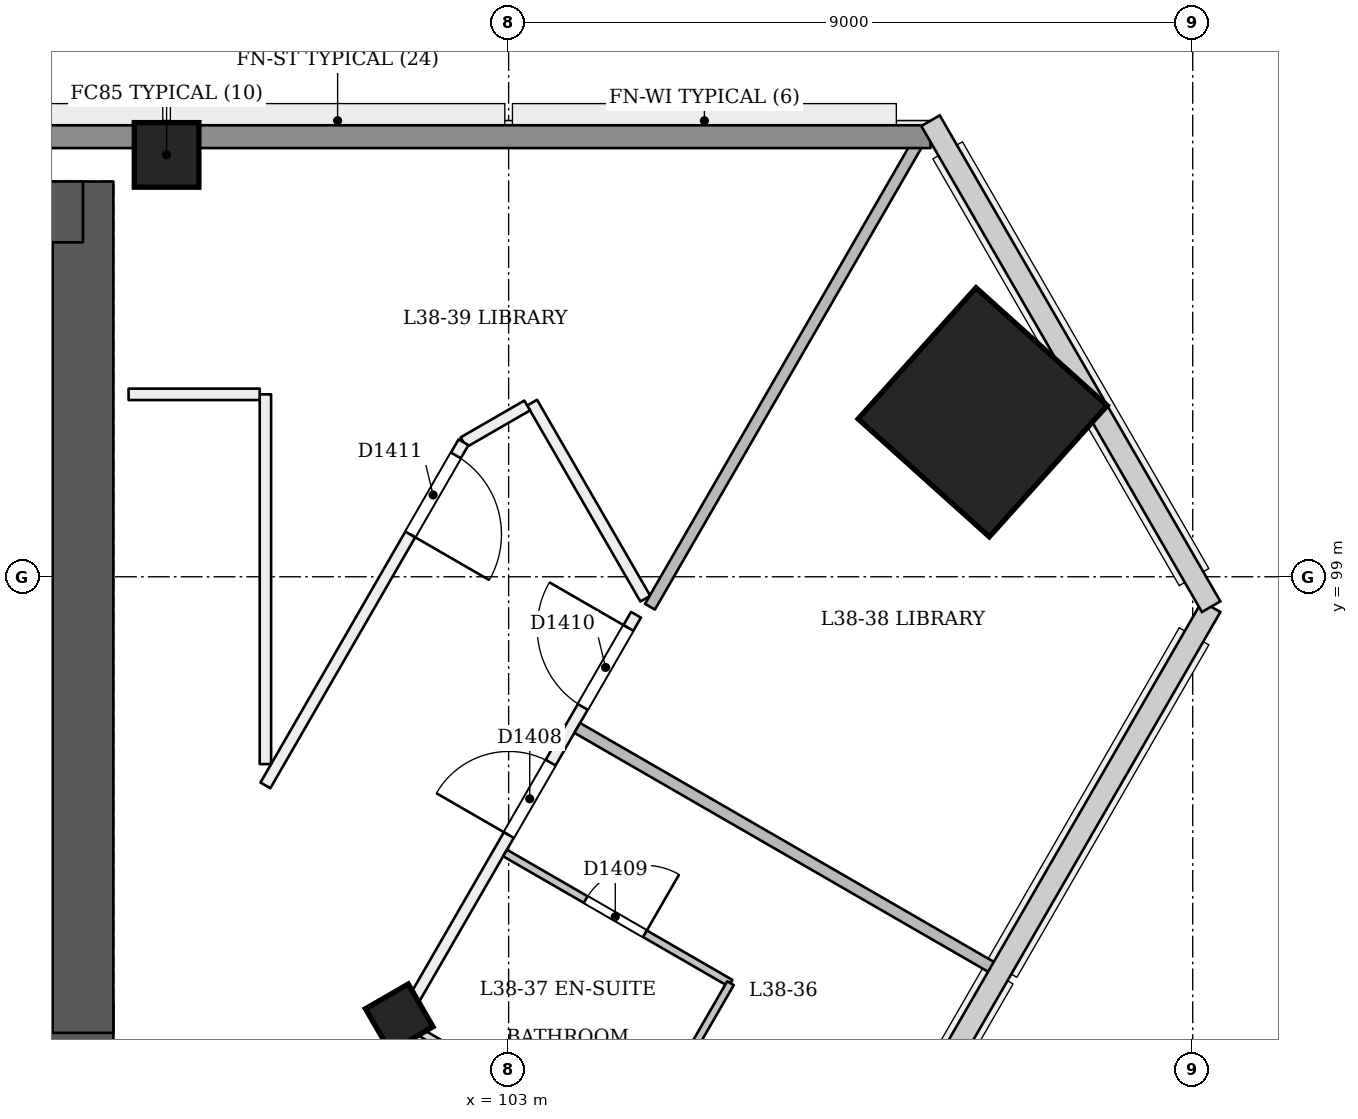
"""IFC4 building model, lengths in metres.
Left out: names, types, materials, properties, quantities, classifications, styles, units other than length and angle.
Written with IfcOpenShell. Run it as: python <this file> out.ifc"""

import sys

from ifc_helpers import new_model, si_unit, direction, frame, frame_2d, origin, origin_2d, place, context, subcontext, project, spatial, rectangle, extrude, element, fill, save


model = new_model("IFC4")
c1 = context("Model", 3, precision=1e-05, world=origin(), true_north=direction((0.0, 1.0)))
c2 = subcontext(c1, "Body", "Model", "MODEL_VIEW")
j1 = project(units=[si_unit("LENGTHUNIT", "METRE"), si_unit("PLANEANGLEUNIT", "RADIAN")], contexts=[c1])
p1 = place(None, origin())
s1 = spatial("IfcSite", under=j1, at=p1, CompositionType="ELEMENT")
p2 = place(p1, origin())
s2 = spatial("IfcBuilding", under=s1, at=p2, CompositionType="ELEMENT")
p3 = place(p2, frame((0.0, 0.0, 149.4)))
s3 = spatial("IfcBuildingStorey", under=s2, at=p3, CompositionType="ELEMENT", Elevation=149.4)
p4 = place(p3, frame((72.6, 93.0, 0.0), z_axis=(0.0, 0.0, 1.0), x_axis=(1.0, 0.0, 0.0)))
e1 = element("IfcWall", 1, at=p4, inside=s3, PredefinedType="SHEAR", context=c2, shape_type="SweptSolid", body=[
    extrude(rectangle(XDim=25.2, YDim=0.8, at=frame_2d((12.6, 0.0))), origin(), (0.0, 0.0, 1.0), 3.6),
])
p5 = place(p4, frame((1.2, 0.0, 0.0)))
e2 = element("IfcOpeningElement", 2, at=p5, cuts=e1, PredefinedType="OPENING", context=c2, shape_type="SweptSolid", body=[
    extrude(rectangle(XDim=1.2, YDim=2.1, at=frame_2d((0.6, 1.05))), frame((0.0, 0.411, 0.0), z_axis=(0.0, -1.0, 0.0), x_axis=(1.0, 0.0, 0.0)), (0.0, 0.0, 1.0), 0.821),
])
p6 = place(p4, frame((3.4, 0.0, 0.0)))
e3 = element("IfcOpeningElement", 3, at=p6, cuts=e1, PredefinedType="OPENING", context=c2, shape_type="SweptSolid", body=[
    extrude(rectangle(XDim=1.2, YDim=2.1, at=frame_2d((0.6, 1.05))), frame((0.0, 0.411, 0.0), z_axis=(0.0, -1.0, 0.0), x_axis=(1.0, 0.0, 0.0)), (0.0, 0.0, 1.0), 0.821),
])
p7 = place(p4, frame((13.4, 0.0, 0.0)))
e4 = element("IfcOpeningElement", 4, at=p7, cuts=e1, PredefinedType="OPENING", context=c2, shape_type="SweptSolid", body=[
    extrude(rectangle(XDim=1.2, YDim=2.1, at=frame_2d((0.6, 1.05))), frame((0.0, 0.411, 0.0), z_axis=(0.0, -1.0, 0.0), x_axis=(1.0, 0.0, 0.0)), (0.0, 0.0, 1.0), 0.821),
])
p8 = place(p4, frame((15.462, 0.0, 0.0)))
e5 = element("IfcOpeningElement", 5, at=p8, cuts=e1, PredefinedType="OPENING", context=c2, shape_type="SweptSolid", body=[
    extrude(rectangle(XDim=1.0, YDim=2.1, at=frame_2d((0.5, 1.05))), frame((0.0, 0.411, 0.0), z_axis=(0.0, -1.0, 0.0), x_axis=(1.0, 0.0, 0.0)), (0.0, 0.0, 1.0), 0.821),
])
p9 = place(p4, frame((17.7, 0.0, 0.0)))
e6 = element("IfcOpeningElement", 6, at=p9, cuts=e1, PredefinedType="OPENING", context=c2, shape_type="SweptSolid", body=[
    extrude(rectangle(XDim=1.0, YDim=2.1, at=frame_2d((0.5, 1.05))), frame((0.0, 0.411, 0.0), z_axis=(0.0, -1.0, 0.0), x_axis=(1.0, 0.0, 0.0)), (0.0, 0.0, 1.0), 0.821),
])
p10 = place(p4, frame((20.25, 0.0, 0.0)))
e7 = element("IfcOpeningElement", 7, at=p10, cuts=e1, PredefinedType="OPENING", context=c2, shape_type="SweptSolid", body=[
    extrude(rectangle(XDim=1.0, YDim=2.1, at=frame_2d((0.5, 1.05))), frame((0.0, 0.411, 0.0), z_axis=(0.0, -1.0, 0.0), x_axis=(1.0, 0.0, 0.0)), (0.0, 0.0, 1.0), 0.821),
])
p11 = place(p4, frame((22.738, 0.0, 0.0)))
e8 = element("IfcOpeningElement", 8, at=p11, cuts=e1, PredefinedType="OPENING", context=c2, shape_type="SweptSolid", body=[
    extrude(rectangle(XDim=1.0, YDim=2.1, at=frame_2d((0.5, 1.05))), frame((0.0, 0.411, 0.0), z_axis=(0.0, -1.0, 0.0), x_axis=(1.0, 0.0, 0.0)), (0.0, 0.0, 1.0), 0.821),
])
p12 = place(p3, frame((97.4, 93.0, 0.0), z_axis=(0.0, 0.0, 1.0), x_axis=(0.0, 1.0, 0.0)))
e9 = element("IfcWall", 9, at=p12, inside=s3, PredefinedType="SHEAR", context=c2, shape_type="SweptSolid", body=[
    extrude(rectangle(XDim=11.2, YDim=0.8, at=frame_2d((5.6, 0.0))), origin(), (0.0, 0.0, 1.0), 3.6),
])
p13 = place(p3, frame((97.4, 103.8, 0.0), z_axis=(0.0, 0.0, 1.0), x_axis=(-1.0, 0.0, 0.0)))
e10 = element("IfcWall", 10, at=p13, inside=s3, PredefinedType="SHEAR", context=c2, shape_type="SweptSolid", body=[
    extrude(rectangle(XDim=25.2, YDim=0.8, at=frame_2d((12.6, 0.0))), origin(), (0.0, 0.0, 1.0), 3.6),
])
p14 = place(p3, frame((101.588, 93.151, -0.02), z_axis=(-0.022222852987, 0.038483477124, 0.999012095419), x_axis=(-0.500174641503, -0.865639430517, 0.022219458401)))
e11 = element("IfcColumn", 11, at=p14, inside=s3, PredefinedType="COLUMN", context=c2, shape_type="SweptSolid", body=[
    extrude(rectangle(XDim=0.65, YDim=0.65, at=origin_2d()), origin(), (0.0, 0.0, 1.0), 3.604),
])
p15 = place(p3, frame((109.271, 101.153, 0.0), z_axis=(-0.028401814599, 0.009218727412, 0.999554076572), x_axis=(0.50074981516, -0.865307099728, 0.022209137265)))
e12 = element("IfcColumn", 12, at=p15, inside=s3, PredefinedType="COLUMN", context=c2, shape_type="SweptSolid", body=[
    extrude(rectangle(XDim=2.32, YDim=2.32, at=origin_2d()), origin(), (0.0, 0.0, 1.0), 3.602),
])
p16 = place(p3, frame((98.5, 104.55, 0.0), z_axis=(0.0, 0.0, 1.0), x_axis=(1.0, 0.0, 0.0)))
e13 = element("IfcColumn", 13, at=p16, inside=s3, PredefinedType="COLUMN", context=c2, shape_type="SweptSolid", body=[
    extrude(rectangle(XDim=0.85, YDim=0.85, at=origin_2d()), origin(), (0.0, 0.0, 1.0), 3.6),
])
p17 = place(p3, frame((85.065, 64.534, 0.0), z_axis=(0.0, 0.0, 1.0), x_axis=(0.500002644497, 0.866023876978, 0.0)))
e14 = element("IfcWall", 14, at=p17, inside=s3, PredefinedType="PARTITIONING", context=c2, shape_type="SweptSolid", body=[
    extrude(rectangle(XDim=39.221, YDim=0.15, at=frame_2d((19.61, 0.0))), origin(), (0.0, 0.0, 1.0), 2.75),
])
p18 = place(p17, frame((0.506, 0.0, 0.0)))
e15 = element("IfcOpeningElement", 15, at=p18, cuts=e14, PredefinedType="OPENING", context=c2, shape_type="SweptSolid", body=[
    extrude(rectangle(XDim=1.2, YDim=2.1, at=frame_2d((0.6, 1.05))), frame((0.0, 0.085, 0.0), z_axis=(0.0, -1.0, 0.0), x_axis=(1.0, 0.0, 0.0)), (0.0, 0.0, 1.0), 0.171),
])
p19 = place(p17, frame((8.825, 0.0, 0.0)))
e16 = element("IfcOpeningElement", 16, at=p19, cuts=e14, PredefinedType="OPENING", context=c2, shape_type="SweptSolid", body=[
    extrude(rectangle(XDim=1.0, YDim=2.1, at=frame_2d((0.5, 1.05))), frame((0.0, 0.085, 0.0), z_axis=(0.0, -1.0, 0.0), x_axis=(1.0, 0.0, 0.0)), (0.0, 0.0, 1.0), 0.171),
])
p20 = place(p17, frame((11.266, 0.0, 0.0)))
e17 = element("IfcOpeningElement", 17, at=p20, cuts=e14, PredefinedType="OPENING", context=c2, shape_type="SweptSolid", body=[
    extrude(rectangle(XDim=1.0, YDim=2.1, at=frame_2d((0.5, 1.05))), frame((0.0, 0.085, 0.0), z_axis=(0.0, -1.0, 0.0), x_axis=(1.0, 0.0, 0.0)), (0.0, 0.0, 1.0), 0.171),
])
p21 = place(p17, frame((17.825, 0.0, 0.0)))
e18 = element("IfcOpeningElement", 18, at=p21, cuts=e14, PredefinedType="OPENING", context=c2, shape_type="SweptSolid", body=[
    extrude(rectangle(XDim=1.0, YDim=2.1, at=frame_2d((0.5, 1.05))), frame((0.0, 0.085, 0.0), z_axis=(0.0, -1.0, 0.0), x_axis=(1.0, 0.0, 0.0)), (0.0, 0.0, 1.0), 0.171),
])
p22 = place(p17, frame((20.266, 0.0, 0.0)))
e19 = element("IfcOpeningElement", 19, at=p22, cuts=e14, PredefinedType="OPENING", context=c2, shape_type="SweptSolid", body=[
    extrude(rectangle(XDim=1.0, YDim=2.1, at=frame_2d((0.5, 1.05))), frame((0.0, 0.085, 0.0), z_axis=(0.0, -1.0, 0.0), x_axis=(1.0, 0.0, 0.0)), (0.0, 0.0, 1.0), 0.171),
])
p23 = place(p17, frame((26.825, 0.0, 0.0)))
e20 = element("IfcOpeningElement", 20, at=p23, cuts=e14, PredefinedType="OPENING", context=c2, shape_type="SweptSolid", body=[
    extrude(rectangle(XDim=1.0, YDim=2.1, at=frame_2d((0.5, 1.05))), frame((0.0, 0.085, 0.0), z_axis=(0.0, -1.0, 0.0), x_axis=(1.0, 0.0, 0.0)), (0.0, 0.0, 1.0), 0.171),
])
p24 = place(p17, frame((30.296, 0.0, 0.0)))
e21 = element("IfcOpeningElement", 21, at=p24, cuts=e14, PredefinedType="OPENING", context=c2, shape_type="SweptSolid", body=[
    extrude(rectangle(XDim=1.0, YDim=2.1, at=frame_2d((0.5, 1.05))), frame((0.0, 0.085, 0.0), z_axis=(0.0, -1.0, 0.0), x_axis=(1.0, 0.0, 0.0)), (0.0, 0.0, 1.0), 0.171),
])
p25 = place(p17, frame((35.875, 0.0, 0.0)))
e22 = element("IfcOpeningElement", 22, at=p25, cuts=e14, PredefinedType="OPENING", context=c2, shape_type="SweptSolid", body=[
    extrude(rectangle(XDim=1.1, YDim=2.1, at=frame_2d((0.55, 1.05))), frame((0.0, 0.085, 0.0), z_axis=(0.0, -1.0, 0.0), x_axis=(1.0, 0.0, 0.0)), (0.0, 0.0, 1.0), 0.171),
])
p26 = place(p17, frame((37.821, 0.0, 0.0)))
e23 = element("IfcOpeningElement", 23, at=p26, cuts=e14, PredefinedType="OPENING", context=c2, shape_type="SweptSolid", body=[
    extrude(rectangle(XDim=1.2, YDim=2.1, at=frame_2d((0.6, 1.05))), frame((0.0, 0.085, 0.0), z_axis=(0.0, -1.0, 0.0), x_axis=(1.0, 0.0, 0.0)), (0.0, 0.0, 1.0), 0.171),
])
p27 = place(p3, frame((104.798, 98.712, 0.0), z_axis=(0.0, 0.0, 1.0), x_axis=(-0.500001626982, 0.866024464444, 0.0)))
e24 = element("IfcWall", 24, at=p27, inside=s3, PredefinedType="PARTITIONING", context=c2, shape_type="SweptSolid", body=[
    extrude(rectangle(XDim=2.978, YDim=0.15, at=frame_2d((1.489, 0.0))), origin(), (0.0, 0.0, 1.0), 3.15),
])
p28 = place(p3, frame((103.244, 101.253, 0.0), z_axis=(0.0, 0.0, 1.0), x_axis=(-0.866093196455, -0.499882561262, 0.0)))
e25 = element("IfcWall", 25, at=p28, inside=s3, PredefinedType="PARTITIONING", context=c2, shape_type="SweptSolid", body=[
    extrude(rectangle(XDim=0.968, YDim=0.15, at=frame_2d((0.484, 0.0))), origin(), (0.0, 0.0, 1.0), 3.15),
])
p29 = place(p3, frame((102.406, 100.769, 0.0), z_axis=(0.0, 0.0, 1.0), x_axis=(-0.499977898262, -0.866038163853, 0.0)))
e26 = element("IfcWall", 26, at=p29, inside=s3, PredefinedType="PARTITIONING", context=c2, shape_type="SweptSolid", body=[
    extrude(rectangle(XDim=5.212, YDim=0.15, at=frame_2d((2.606, 0.0))), origin(), (0.0, 0.0, 1.0), 3.15),
])
p30 = place(p29, frame((0.2, 0.0, 0.0)))
e27 = element("IfcOpeningElement", 27, at=p30, cuts=e26, PredefinedType="OPENING", context=c2, shape_type="SweptSolid", body=[
    extrude(rectangle(XDim=1.2, YDim=2.1, at=frame_2d((0.6, 1.05))), frame((0.0, 0.085, 0.0), z_axis=(0.0, -1.0, 0.0), x_axis=(1.0, 0.0, 0.0)), (0.0, 0.0, 1.0), 0.171),
])
p31 = place(p3, frame((99.8, 96.535, 0.0), z_axis=(0.0, 0.0, 1.0), x_axis=(0.0, 1.0, 0.0)))
e28 = element("IfcWall", 28, at=p31, inside=s3, PredefinedType="PARTITIONING", context=c2, shape_type="SweptSolid", body=[
    extrude(rectangle(XDim=4.865, YDim=0.15, at=frame_2d((2.432, 0.0))), origin(), (0.0, 0.0, 1.0), 3.15),
])
p32 = place(p3, frame((99.725, 101.4, 0.0), z_axis=(0.0, 0.0, 1.0), x_axis=(-1.0, 0.0, 0.0)))
e29 = element("IfcWall", 29, at=p32, inside=s3, PredefinedType="PARTITIONING", context=c2, shape_type="SweptSolid", body=[
    extrude(rectangle(XDim=1.725, YDim=0.15, at=frame_2d((0.863, 0.0))), origin(), (0.0, 0.0, 1.0), 3.15),
])
p33 = place(p3, frame((104.619, 91.402, 0.0), z_axis=(0.0, 0.0, 1.0), x_axis=(-0.866019409031, 0.500010383074, 0.0)))
e30 = element("IfcWall", 30, at=p33, inside=s3, PredefinedType="PARTITIONING", context=c2, shape_type="SweptSolid", body=[
    extrude(rectangle(XDim=3.425, YDim=0.1, at=frame_2d((1.713, 0.0))), origin(), (0.0, 0.0, 1.0), 2.75),
])
p34 = place(p3, frame((102.953, 95.366, 0.0), z_axis=(0.0, 0.0, 1.0), x_axis=(0.866032454348, -0.499987787867, 0.0)))
e31 = element("IfcWall", 31, at=p34, inside=s3, PredefinedType="PARTITIONING", context=c2, shape_type="SweptSolid", body=[
    extrude(rectangle(XDim=3.425, YDim=0.1, at=frame_2d((1.712, 0.0))), origin(), (0.0, 0.0, 1.0), 3.15),
])
p35 = place(p34, frame((1.225, 0.0, 0.0)))
e32 = element("IfcOpeningElement", 32, at=p35, cuts=e31, PredefinedType="OPENING", context=c2, shape_type="SweptSolid", body=[
    extrude(rectangle(XDim=0.9, YDim=2.1, at=frame_2d((0.45, 1.05))), frame((0.0, 0.061, 0.0), z_axis=(0.0, -1.0, 0.0), x_axis=(1.0, 0.0, 0.0)), (0.0, 0.0, 1.0), 0.121),
])
p36 = place(p3, frame((105.919, 93.654, 0.0), z_axis=(0.0, 0.0, 1.0), x_axis=(-0.499936506574, -0.866062058628, 0.0)))
e33 = element("IfcWall", 33, at=p36, inside=s3, PredefinedType="PARTITIONING", context=c2, shape_type="SweptSolid", body=[
    extrude(rectangle(XDim=2.6, YDim=0.1, at=frame_2d((1.3, 0.0))), origin(), (0.0, 0.0, 1.0), 2.75),
])
p37 = place(p3, frame((109.398, 93.839, 0.0), z_axis=(0.0, 0.0, 1.0), x_axis=(-0.866025401434, 0.500000004071, 0.0)))
e34 = element("IfcWall", 34, at=p37, inside=s3, PredefinedType="PARTITIONING", context=c2, shape_type="SweptSolid", body=[
    extrude(rectangle(XDim=6.345, YDim=0.15, at=frame_2d((3.173, 0.0))), origin(), (0.0, 0.0, 1.0), 2.65),
])
p38 = place(p3, frame((108.493, 104.9, 0.0), z_axis=(0.0, 0.0, 1.0), x_axis=(-0.500012280482, -0.866018313528, 0.0)))
e35 = element("IfcWall", 35, at=p38, inside=s3, PredefinedType="PARTITIONING", context=c2, shape_type="SweptSolid", body=[
    extrude(rectangle(XDim=7.267, YDim=0.15, at=frame_2d((3.634, 0.0))), origin(), (0.0, 0.0, 1.0), 2.65),
])
p39 = place(p3, frame((61.449, 104.79, 0.0), z_axis=(0.0, 0.0, 1.0), x_axis=(1.0, 0.0, 0.0)))
e36 = element("IfcWall", 36, at=p39, inside=s3, PredefinedType="SOLIDWALL", context=c2, shape_type="SweptSolid", body=[
    extrude(rectangle(XDim=47.102, YDim=0.3, at=frame_2d((23.551, 0.0))), origin(), (0.0, 0.0, 1.0), 2.65),
])
p40 = place(p25, origin())
e37 = element("IfcDoor", 37, at=p40, inside=s3, OperationType="SINGLE_SWING_LEFT", PredefinedType="NOTDEFINED", context=c2, shape_type="SweptSolid", body=[
    extrude(rectangle(XDim=1.1, YDim=2.1, at=frame_2d((0.55, 1.05))), frame((0.0, 0.025, 0.0), z_axis=(0.0, -1.0, 0.0), x_axis=(1.0, 0.0, 0.0)), (0.0, 0.0, 1.0), 0.05),
])
fill(e22, e37)
p41 = place(p35, origin())
e38 = element("IfcDoor", 38, at=p41, inside=s3, OperationType="SINGLE_SWING_RIGHT", PredefinedType="NOTDEFINED", context=c2, shape_type="SweptSolid", body=[
    extrude(rectangle(XDim=0.9, YDim=2.1, at=frame_2d((0.45, 1.05))), frame((0.0, 0.025, 0.0), z_axis=(0.0, -1.0, 0.0), x_axis=(1.0, 0.0, 0.0)), (0.0, 0.0, 1.0), 0.05),
])
fill(e32, e38)
p42 = place(p26, origin())
e39 = element("IfcDoor", 39, at=p42, inside=s3, OperationType="SINGLE_SWING_RIGHT", PredefinedType="NOTDEFINED", context=c2, shape_type="SweptSolid", body=[
    extrude(rectangle(XDim=1.2, YDim=2.1, at=frame_2d((0.6, 1.05))), frame((0.0, 0.025, 0.0), z_axis=(0.0, -1.0, 0.0), x_axis=(1.0, 0.0, 0.0)), (0.0, 0.0, 1.0), 0.05),
])
fill(e23, e39)
p43 = place(p30, origin())
e40 = element("IfcDoor", 40, at=p43, inside=s3, OperationType="SINGLE_SWING_RIGHT", PredefinedType="NOTDEFINED", context=c2, shape_type="SweptSolid", body=[
    extrude(rectangle(XDim=1.2, YDim=2.1, at=frame_2d((0.6, 1.05))), frame((0.0, 0.025, 0.0), z_axis=(0.0, -1.0, 0.0), x_axis=(1.0, 0.0, 0.0)), (0.0, 0.0, 1.0), 0.05),
])
fill(e27, e40)
save(model, sys.argv[1])
